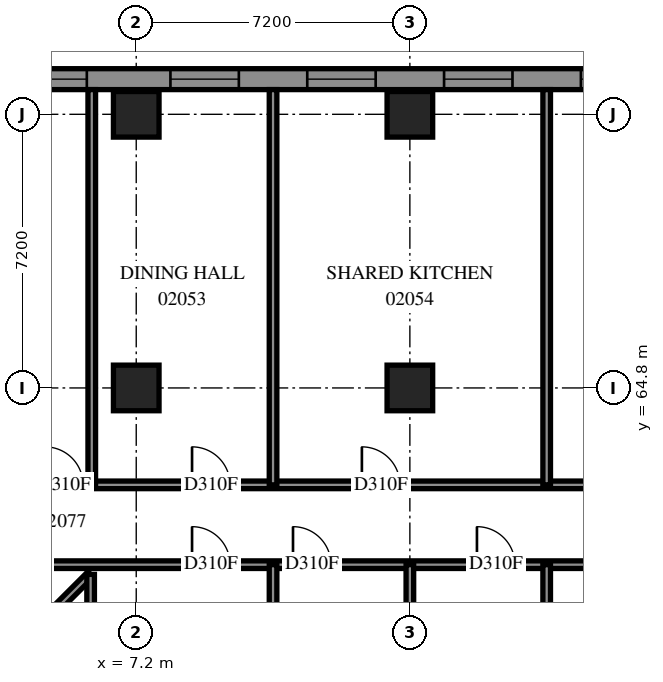
"""IFC4 building model, lengths in metres.
Left out: names, types, materials, properties, quantities, classifications, styles, units other than length and angle.
Written with IfcOpenShell. Run it as: python <this file> out.ifc"""

import sys

from ifc_helpers import new_model, si_unit, direction, frame, frame_2d, origin, origin_2d, place, context, subcontext, project, spatial, polyline, rectangle, outline, extrude, element, fill, save


model = new_model("IFC4")
c1 = context("Model", 3, precision=1e-05, world=origin(), true_north=direction((0.0, 1.0)))
c2 = subcontext(c1, "Body", "Model", "MODEL_VIEW")
j1 = project(units=[si_unit("LENGTHUNIT", "METRE"), si_unit("PLANEANGLEUNIT", "RADIAN")], contexts=[c1])
p1 = place(None, origin())
s1 = spatial("IfcSite", under=j1, at=p1, CompositionType="ELEMENT")
p2 = place(p1, origin())
s2 = spatial("IfcBuilding", under=s1, at=p2, CompositionType="ELEMENT")
p3 = place(p2, frame((0.0, 0.0, 10.2)))
s3 = spatial("IfcBuildingStorey", under=s2, at=p3, CompositionType="ELEMENT", Elevation=10.2)
for number, where, z_axis, x_axis in (
    (1, (7.2, 64.8, 0.0), (0.0, 0.0, 1.0), (1.0, 0.0, 0.0)),
    (2, (7.2, 72.0, 0.0), (0.0, 0.0, 1.0), (1.0, 0.0, 0.0)),
    (3, (14.4, 64.8, 0.0), (0.0, 0.0, 1.0), (1.0, 0.0, 0.0)),
    (4, (14.4, 72.0, 0.0), (0.0, 0.0, 1.0), (1.0, 0.0, 0.0)),
):
    element("IfcColumn", number, at=place(p3, frame(where, z_axis=z_axis, x_axis=x_axis)), inside=s3, PredefinedType="COLUMN", context=c2, shape_type="SweptSolid", body=[
        extrude(rectangle(XDim=1.2, YDim=1.2, at=origin_2d()), origin(), (0.0, 0.0, 1.0), 3.8),
    ])
p4 = place(p3, frame((79.583, 72.925, 0.0), z_axis=(0.0, 0.0, 1.0), x_axis=(-1.0, 0.0, 0.0)))
e5 = element("IfcWall", 5, at=p4, inside=s3, PredefinedType="SOLIDWALL", context=c2, shape_type="SweptSolid", body=[
    extrude(outline(polyline([(-0.114, -0.275), (79.583, -0.275), (79.033, 0.275), (0.114, 0.275), (-0.114, -0.275)])), origin(), (0.0, 0.0, 1.0), 3.8),
])
p5 = place(p4, frame((1.249, 0.0, 0.7)))
e6 = element("IfcOpeningElement", 6, at=p5, cuts=e5, PredefinedType="OPENING", context=c2, shape_type="SweptSolid", body=[
    extrude(rectangle(XDim=1.8, YDim=2.6, at=frame_2d((0.9, 1.3))), frame((0.0, 0.285, 0.0), z_axis=(0.0, -1.0, 0.0), x_axis=(1.0, 0.0, 0.0)), (0.0, 0.0, 1.0), 0.57),
])
p6 = place(p4, frame((4.883, 0.0, 0.7)))
e7 = element("IfcOpeningElement", 7, at=p6, cuts=e5, PredefinedType="OPENING", context=c2, shape_type="SweptSolid", body=[
    extrude(rectangle(XDim=1.8, YDim=2.6, at=frame_2d((0.9, 1.3))), frame((0.0, 0.285, 0.0), z_axis=(0.0, -1.0, 0.0), x_axis=(1.0, 0.0, 0.0)), (0.0, 0.0, 1.0), 0.57),
])
p7 = place(p4, frame((8.483, 0.0, 0.7)))
e8 = element("IfcOpeningElement", 8, at=p7, cuts=e5, PredefinedType="OPENING", context=c2, shape_type="SweptSolid", body=[
    extrude(rectangle(XDim=1.8, YDim=2.6, at=frame_2d((0.9, 1.3))), frame((0.0, 0.285, 0.0), z_axis=(0.0, -1.0, 0.0), x_axis=(1.0, 0.0, 0.0)), (0.0, 0.0, 1.0), 0.57),
])
p8 = place(p4, frame((12.083, 0.0, 0.7)))
e9 = element("IfcOpeningElement", 9, at=p8, cuts=e5, PredefinedType="OPENING", context=c2, shape_type="SweptSolid", body=[
    extrude(rectangle(XDim=1.8, YDim=2.6, at=frame_2d((0.9, 1.3))), frame((0.0, 0.285, 0.0), z_axis=(0.0, -1.0, 0.0), x_axis=(1.0, 0.0, 0.0)), (0.0, 0.0, 1.0), 0.57),
])
p9 = place(p4, frame((15.683, 0.0, 0.7)))
e10 = element("IfcOpeningElement", 10, at=p9, cuts=e5, PredefinedType="OPENING", context=c2, shape_type="SweptSolid", body=[
    extrude(rectangle(XDim=1.8, YDim=2.6, at=frame_2d((0.9, 1.3))), frame((0.0, 0.285, 0.0), z_axis=(0.0, -1.0, 0.0), x_axis=(1.0, 0.0, 0.0)), (0.0, 0.0, 1.0), 0.57),
])
p10 = place(p4, frame((19.283, 0.0, 0.7)))
e11 = element("IfcOpeningElement", 11, at=p10, cuts=e5, PredefinedType="OPENING", context=c2, shape_type="SweptSolid", body=[
    extrude(rectangle(XDim=1.8, YDim=2.6, at=frame_2d((0.9, 1.3))), frame((0.0, 0.285, 0.0), z_axis=(0.0, -1.0, 0.0), x_axis=(1.0, 0.0, 0.0)), (0.0, 0.0, 1.0), 0.57),
])
p11 = place(p4, frame((22.883, 0.0, 0.7)))
e12 = element("IfcOpeningElement", 12, at=p11, cuts=e5, PredefinedType="OPENING", context=c2, shape_type="SweptSolid", body=[
    extrude(rectangle(XDim=1.8, YDim=2.6, at=frame_2d((0.9, 1.3))), frame((0.0, 0.285, 0.0), z_axis=(0.0, -1.0, 0.0), x_axis=(1.0, 0.0, 0.0)), (0.0, 0.0, 1.0), 0.57),
])
p12 = place(p4, frame((26.483, 0.0, 0.7)))
e13 = element("IfcOpeningElement", 13, at=p12, cuts=e5, PredefinedType="OPENING", context=c2, shape_type="SweptSolid", body=[
    extrude(rectangle(XDim=1.8, YDim=2.6, at=frame_2d((0.9, 1.3))), frame((0.0, 0.285, 0.0), z_axis=(0.0, -1.0, 0.0), x_axis=(1.0, 0.0, 0.0)), (0.0, 0.0, 1.0), 0.57),
])
p13 = place(p4, frame((30.083, 0.0, 0.7)))
e14 = element("IfcOpeningElement", 14, at=p13, cuts=e5, PredefinedType="OPENING", context=c2, shape_type="SweptSolid", body=[
    extrude(rectangle(XDim=1.8, YDim=2.6, at=frame_2d((0.9, 1.3))), frame((0.0, 0.285, 0.0), z_axis=(0.0, -1.0, 0.0), x_axis=(1.0, 0.0, 0.0)), (0.0, 0.0, 1.0), 0.57),
])
p14 = place(p4, frame((33.683, 0.0, 0.7)))
e15 = element("IfcOpeningElement", 15, at=p14, cuts=e5, PredefinedType="OPENING", context=c2, shape_type="SweptSolid", body=[
    extrude(rectangle(XDim=1.8, YDim=2.6, at=frame_2d((0.9, 1.3))), frame((0.0, 0.285, 0.0), z_axis=(0.0, -1.0, 0.0), x_axis=(1.0, 0.0, 0.0)), (0.0, 0.0, 1.0), 0.57),
])
p15 = place(p4, frame((37.283, 0.0, 0.7)))
e16 = element("IfcOpeningElement", 16, at=p15, cuts=e5, PredefinedType="OPENING", context=c2, shape_type="SweptSolid", body=[
    extrude(rectangle(XDim=1.8, YDim=2.6, at=frame_2d((0.9, 1.3))), frame((0.0, 0.285, 0.0), z_axis=(0.0, -1.0, 0.0), x_axis=(1.0, 0.0, 0.0)), (0.0, 0.0, 1.0), 0.57),
])
p16 = place(p4, frame((40.883, 0.0, 0.7)))
e17 = element("IfcOpeningElement", 17, at=p16, cuts=e5, PredefinedType="OPENING", context=c2, shape_type="SweptSolid", body=[
    extrude(rectangle(XDim=1.8, YDim=2.6, at=frame_2d((0.9, 1.3))), frame((0.0, 0.285, 0.0), z_axis=(0.0, -1.0, 0.0), x_axis=(1.0, 0.0, 0.0)), (0.0, 0.0, 1.0), 0.57),
])
p17 = place(p4, frame((44.483, 0.0, 0.7)))
e18 = element("IfcOpeningElement", 18, at=p17, cuts=e5, PredefinedType="OPENING", context=c2, shape_type="SweptSolid", body=[
    extrude(rectangle(XDim=1.8, YDim=2.6, at=frame_2d((0.9, 1.3))), frame((0.0, 0.285, 0.0), z_axis=(0.0, -1.0, 0.0), x_axis=(1.0, 0.0, 0.0)), (0.0, 0.0, 1.0), 0.57),
])
p18 = place(p4, frame((48.083, 0.0, 0.7)))
e19 = element("IfcOpeningElement", 19, at=p18, cuts=e5, PredefinedType="OPENING", context=c2, shape_type="SweptSolid", body=[
    extrude(rectangle(XDim=1.8, YDim=2.6, at=frame_2d((0.9, 1.3))), frame((0.0, 0.285, 0.0), z_axis=(0.0, -1.0, 0.0), x_axis=(1.0, 0.0, 0.0)), (0.0, 0.0, 1.0), 0.57),
])
p19 = place(p4, frame((51.683, 0.0, 0.7)))
e20 = element("IfcOpeningElement", 20, at=p19, cuts=e5, PredefinedType="OPENING", context=c2, shape_type="SweptSolid", body=[
    extrude(rectangle(XDim=1.8, YDim=2.6, at=frame_2d((0.9, 1.3))), frame((0.0, 0.285, 0.0), z_axis=(0.0, -1.0, 0.0), x_axis=(1.0, 0.0, 0.0)), (0.0, 0.0, 1.0), 0.57),
])
p20 = place(p4, frame((55.283, 0.0, 0.7)))
e21 = element("IfcOpeningElement", 21, at=p20, cuts=e5, PredefinedType="OPENING", context=c2, shape_type="SweptSolid", body=[
    extrude(rectangle(XDim=1.8, YDim=2.6, at=frame_2d((0.9, 1.3))), frame((0.0, 0.285, 0.0), z_axis=(0.0, -1.0, 0.0), x_axis=(1.0, 0.0, 0.0)), (0.0, 0.0, 1.0), 0.57),
])
p21 = place(p4, frame((58.883, 0.0, 0.7)))
e22 = element("IfcOpeningElement", 22, at=p21, cuts=e5, PredefinedType="OPENING", context=c2, shape_type="SweptSolid", body=[
    extrude(rectangle(XDim=1.8, YDim=2.6, at=frame_2d((0.9, 1.3))), frame((0.0, 0.285, 0.0), z_axis=(0.0, -1.0, 0.0), x_axis=(1.0, 0.0, 0.0)), (0.0, 0.0, 1.0), 0.57),
])
p22 = place(p4, frame((62.483, 0.0, 0.7)))
e23 = element("IfcOpeningElement", 23, at=p22, cuts=e5, PredefinedType="OPENING", context=c2, shape_type="SweptSolid", body=[
    extrude(rectangle(XDim=1.8, YDim=2.6, at=frame_2d((0.9, 1.3))), frame((0.0, 0.285, 0.0), z_axis=(0.0, -1.0, 0.0), x_axis=(1.0, 0.0, 0.0)), (0.0, 0.0, 1.0), 0.57),
])
p23 = place(p4, frame((66.083, 0.0, 0.7)))
e24 = element("IfcOpeningElement", 24, at=p23, cuts=e5, PredefinedType="OPENING", context=c2, shape_type="SweptSolid", body=[
    extrude(rectangle(XDim=1.8, YDim=2.6, at=frame_2d((0.9, 1.3))), frame((0.0, 0.285, 0.0), z_axis=(0.0, -1.0, 0.0), x_axis=(1.0, 0.0, 0.0)), (0.0, 0.0, 1.0), 0.57),
])
p24 = place(p4, frame((69.683, 0.0, 0.7)))
e25 = element("IfcOpeningElement", 25, at=p24, cuts=e5, PredefinedType="OPENING", context=c2, shape_type="SweptSolid", body=[
    extrude(rectangle(XDim=1.8, YDim=2.6, at=frame_2d((0.9, 1.3))), frame((0.0, 0.285, 0.0), z_axis=(0.0, -1.0, 0.0), x_axis=(1.0, 0.0, 0.0)), (0.0, 0.0, 1.0), 0.57),
])
p25 = place(p4, frame((73.683, 0.0, 0.7)))
e26 = element("IfcOpeningElement", 26, at=p25, cuts=e5, PredefinedType="OPENING", context=c2, shape_type="SweptSolid", body=[
    extrude(rectangle(XDim=1.8, YDim=2.6, at=frame_2d((0.9, 1.3))), frame((0.0, 0.285, 0.0), z_axis=(0.0, -1.0, 0.0), x_axis=(1.0, 0.0, 0.0)), (0.0, 0.0, 1.0), 0.57),
])
p26 = place(p4, frame((76.508, 0.0, 0.7)))
e27 = element("IfcOpeningElement", 27, at=p26, cuts=e5, PredefinedType="OPENING", context=c2, shape_type="SweptSolid", body=[
    extrude(rectangle(XDim=1.8, YDim=2.6, at=frame_2d((0.9, 1.3))), frame((0.0, 0.285, 0.0), z_axis=(0.0, -1.0, 0.0), x_axis=(1.0, 0.0, 0.0)), (0.0, 0.0, 1.0), 0.57),
])
p27 = place(p3, frame((0.002, 60.15, 0.0), z_axis=(0.0, 0.0, 1.0), x_axis=(1.0, 0.0, 0.0)))
e28 = element("IfcWall", 28, at=p27, inside=s3, PredefinedType="PARTITIONING", context=c2, shape_type="SweptSolid", body=[
    extrude(rectangle(XDim=54.498, YDim=0.2, at=frame_2d((27.249, 0.0))), origin(), (0.0, 0.0, 1.0), 3.8),
])
p28 = place(p27, frame((8.667, 0.0, 0.0)))
e29 = element("IfcOpeningElement", 29, at=p28, cuts=e28, PredefinedType="OPENING", context=c2, shape_type="SweptSolid", body=[
    extrude(rectangle(XDim=1.0, YDim=2.1, at=frame_2d((0.5, 1.05))), frame((0.0, 0.11, 0.0), z_axis=(0.0, -1.0, 0.0), x_axis=(1.0, 0.0, 0.0)), (0.0, 0.0, 1.0), 0.22),
])
p29 = place(p27, frame((11.323, 0.0, 0.0)))
e30 = element("IfcOpeningElement", 30, at=p29, cuts=e28, PredefinedType="OPENING", context=c2, shape_type="SweptSolid", body=[
    extrude(rectangle(XDim=1.0, YDim=2.1, at=frame_2d((0.5, 1.05))), frame((0.0, 0.11, 0.0), z_axis=(0.0, -1.0, 0.0), x_axis=(1.0, 0.0, 0.0)), (0.0, 0.0, 1.0), 0.22),
])
p30 = place(p27, frame((16.163, 0.0, 0.0)))
e31 = element("IfcOpeningElement", 31, at=p30, cuts=e28, PredefinedType="OPENING", context=c2, shape_type="SweptSolid", body=[
    extrude(rectangle(XDim=1.0, YDim=2.1, at=frame_2d((0.5, 1.05))), frame((0.0, 0.11, 0.0), z_axis=(0.0, -1.0, 0.0), x_axis=(1.0, 0.0, 0.0)), (0.0, 0.0, 1.0), 0.22),
])
p31 = place(p27, frame((22.14, 0.0, 0.0)))
e32 = element("IfcOpeningElement", 32, at=p31, cuts=e28, PredefinedType="OPENING", context=c2, shape_type="SweptSolid", body=[
    extrude(rectangle(XDim=1.0, YDim=2.1, at=frame_2d((0.5, 1.05))), frame((0.0, 0.11, 0.0), z_axis=(0.0, -1.0, 0.0), x_axis=(1.0, 0.0, 0.0)), (0.0, 0.0, 1.0), 0.22),
])
p32 = place(p27, frame((30.563, 0.0, 0.0)))
e33 = element("IfcOpeningElement", 33, at=p32, cuts=e28, PredefinedType="OPENING", context=c2, shape_type="SweptSolid", body=[
    extrude(rectangle(XDim=1.0, YDim=2.1, at=frame_2d((0.5, 1.05))), frame((0.0, 0.11, 0.0), z_axis=(0.0, -1.0, 0.0), x_axis=(1.0, 0.0, 0.0)), (0.0, 0.0, 1.0), 0.22),
])
p33 = place(p27, frame((33.233, 0.0, 0.0)))
e34 = element("IfcOpeningElement", 34, at=p33, cuts=e28, PredefinedType="OPENING", context=c2, shape_type="SweptSolid", body=[
    extrude(rectangle(XDim=1.0, YDim=2.1, at=frame_2d((0.5, 1.05))), frame((0.0, 0.11, 0.0), z_axis=(0.0, -1.0, 0.0), x_axis=(1.0, 0.0, 0.0)), (0.0, 0.0, 1.0), 0.22),
])
p34 = place(p27, frame((38.073, 0.0, 0.0)))
e35 = element("IfcOpeningElement", 35, at=p34, cuts=e28, PredefinedType="OPENING", context=c2, shape_type="SweptSolid", body=[
    extrude(rectangle(XDim=1.0, YDim=2.1, at=frame_2d((0.5, 1.05))), frame((0.0, 0.11, 0.0), z_axis=(0.0, -1.0, 0.0), x_axis=(1.0, 0.0, 0.0)), (0.0, 0.0, 1.0), 0.22),
])
p35 = place(p27, frame((40.123, 0.0, 0.0)))
e36 = element("IfcOpeningElement", 36, at=p35, cuts=e28, PredefinedType="OPENING", context=c2, shape_type="SweptSolid", body=[
    extrude(rectangle(XDim=1.0, YDim=2.1, at=frame_2d((0.5, 1.05))), frame((0.0, 0.11, 0.0), z_axis=(0.0, -1.0, 0.0), x_axis=(1.0, 0.0, 0.0)), (0.0, 0.0, 1.0), 0.22),
])
p36 = place(p27, frame((44.963, 0.0, 0.0)))
e37 = element("IfcOpeningElement", 37, at=p36, cuts=e28, PredefinedType="OPENING", context=c2, shape_type="SweptSolid", body=[
    extrude(rectangle(XDim=1.0, YDim=2.1, at=frame_2d((0.5, 1.05))), frame((0.0, 0.11, 0.0), z_axis=(0.0, -1.0, 0.0), x_axis=(1.0, 0.0, 0.0)), (0.0, 0.0, 1.0), 0.22),
])
p37 = place(p27, frame((47.323, 0.0, 0.0)))
e38 = element("IfcOpeningElement", 38, at=p37, cuts=e28, PredefinedType="OPENING", context=c2, shape_type="SweptSolid", body=[
    extrude(rectangle(XDim=1.0, YDim=2.1, at=frame_2d((0.5, 1.05))), frame((0.0, 0.11, 0.0), z_axis=(0.0, -1.0, 0.0), x_axis=(1.0, 0.0, 0.0)), (0.0, 0.0, 1.0), 0.22),
])
p38 = place(p27, frame((3.747, 0.0, 0.0)))
e39 = element("IfcOpeningElement", 39, at=p38, cuts=e28, PredefinedType="OPENING", context=c2, shape_type="SweptSolid", body=[
    extrude(rectangle(XDim=1.0, YDim=2.1, at=frame_2d((0.5, 1.05))), frame((0.0, 0.11, 0.0), z_axis=(0.0, -1.0, 0.0), x_axis=(1.0, 0.0, 0.0)), (0.0, 0.0, 1.0), 0.22),
])
p39 = place(p3, frame((0.002, 62.25, 0.0), z_axis=(0.0, 0.0, 1.0), x_axis=(1.0, 0.0, 0.0)))
e40 = element("IfcWall", 40, at=p39, inside=s3, PredefinedType="PARTITIONING", context=c2, shape_type="SweptSolid", body=[
    extrude(rectangle(XDim=54.498, YDim=0.2, at=frame_2d((27.249, 0.0))), origin(), (0.0, 0.0, 1.0), 3.8),
])
p40 = place(p39, frame((8.667, 0.0, 0.0)))
e41 = element("IfcOpeningElement", 41, at=p40, cuts=e40, PredefinedType="OPENING", context=c2, shape_type="SweptSolid", body=[
    extrude(rectangle(XDim=1.0, YDim=2.1, at=frame_2d((0.5, 1.05))), frame((0.0, 0.11, 0.0), z_axis=(0.0, -1.0, 0.0), x_axis=(1.0, 0.0, 0.0)), (0.0, 0.0, 1.0), 0.22),
])
p41 = place(p39, frame((13.136, 0.0, 0.0)))
e42 = element("IfcOpeningElement", 42, at=p41, cuts=e40, PredefinedType="OPENING", context=c2, shape_type="SweptSolid", body=[
    extrude(rectangle(XDim=1.0, YDim=2.1, at=frame_2d((0.5, 1.05))), frame((0.0, 0.11, 0.0), z_axis=(0.0, -1.0, 0.0), x_axis=(1.0, 0.0, 0.0)), (0.0, 0.0, 1.0), 0.22),
])
p42 = place(p39, frame((20.335, 0.0, 0.0)))
e43 = element("IfcOpeningElement", 43, at=p42, cuts=e40, PredefinedType="OPENING", context=c2, shape_type="SweptSolid", body=[
    extrude(rectangle(XDim=1.0, YDim=2.1, at=frame_2d((0.5, 1.05))), frame((0.0, 0.11, 0.0), z_axis=(0.0, -1.0, 0.0), x_axis=(1.0, 0.0, 0.0)), (0.0, 0.0, 1.0), 0.22),
])
p43 = place(p39, frame((27.535, 0.0, 0.0)))
e44 = element("IfcOpeningElement", 44, at=p43, cuts=e40, PredefinedType="OPENING", context=c2, shape_type="SweptSolid", body=[
    extrude(rectangle(XDim=1.0, YDim=2.1, at=frame_2d((0.5, 1.05))), frame((0.0, 0.11, 0.0), z_axis=(0.0, -1.0, 0.0), x_axis=(1.0, 0.0, 0.0)), (0.0, 0.0, 1.0), 0.22),
])
p44 = place(p39, frame((34.736, 0.0, 0.0)))
e45 = element("IfcOpeningElement", 45, at=p44, cuts=e40, PredefinedType="OPENING", context=c2, shape_type="SweptSolid", body=[
    extrude(rectangle(XDim=1.0, YDim=2.1, at=frame_2d((0.5, 1.05))), frame((0.0, 0.11, 0.0), z_axis=(0.0, -1.0, 0.0), x_axis=(1.0, 0.0, 0.0)), (0.0, 0.0, 1.0), 0.22),
])
p45 = place(p39, frame((41.935, 0.0, 0.0)))
e46 = element("IfcOpeningElement", 46, at=p45, cuts=e40, PredefinedType="OPENING", context=c2, shape_type="SweptSolid", body=[
    extrude(rectangle(XDim=1.0, YDim=2.1, at=frame_2d((0.5, 1.05))), frame((0.0, 0.11, 0.0), z_axis=(0.0, -1.0, 0.0), x_axis=(1.0, 0.0, 0.0)), (0.0, 0.0, 1.0), 0.22),
])
p46 = place(p39, frame((49.136, 0.0, 0.0)))
e47 = element("IfcOpeningElement", 47, at=p46, cuts=e40, PredefinedType="OPENING", context=c2, shape_type="SweptSolid", body=[
    extrude(rectangle(XDim=1.0, YDim=2.1, at=frame_2d((0.5, 1.05))), frame((0.0, 0.11, 0.0), z_axis=(0.0, -1.0, 0.0), x_axis=(1.0, 0.0, 0.0)), (0.0, 0.0, 1.0), 0.22),
])
p47 = place(p39, frame((4.799, 0.0, 0.0)))
e48 = element("IfcOpeningElement", 48, at=p47, cuts=e40, PredefinedType="OPENING", context=c2, shape_type="SweptSolid", body=[
    extrude(rectangle(XDim=1.0, YDim=2.1, at=frame_2d((0.5, 1.05))), frame((0.0, 0.11, 0.0), z_axis=(0.0, -1.0, 0.0), x_axis=(1.0, 0.0, 0.0)), (0.0, 0.0, 1.0), 0.22),
])
for number, where, z_axis, x_axis in (
    (49, (6.03, 62.25, 0.0), (0.0, 0.0, 1.0), (0.0, 1.0, 0.0)),
    (50, (10.8, 62.25, 0.0), (0.0, 0.0, 1.0), (0.0, 1.0, 0.0)),
    (51, (18.0, 62.25, 0.0), (0.0, 0.0, 1.0), (0.0, 1.0, 0.0)),
):
    element("IfcWall", number, at=place(p3, frame(where, z_axis=z_axis, x_axis=x_axis)), inside=s3, PredefinedType="PARTITIONING", context=c2, shape_type="SweptSolid", body=[
        extrude(rectangle(XDim=10.4, YDim=0.2, at=frame_2d((5.2, 0.0))), origin(), (0.0, 0.0, 1.0), 3.8),
    ])
p48 = place(p3, frame((1.155, 55.051, 0.0), z_axis=(0.0, 0.0, 1.0), x_axis=(0.7071067812, 0.7071067812, 0.0)))
e52 = element("IfcWall", 52, at=p48, inside=s3, PredefinedType="PARTITIONING", context=c2, shape_type="SweptSolid", body=[
    extrude(rectangle(XDim=6.851, YDim=0.2, at=frame_2d((3.425, 0.0))), origin(), (0.0, 0.0, 1.0), 3.8),
])
for number, where, z_axis, x_axis in (
    (53, (10.8, 55.05, 0.0), (0.0, 0.0, 1.0), (0.0, 1.0, 0.0)),
    (54, (18.0, 55.05, 0.0), (0.0, 0.0, 1.0), (0.0, 1.0, 0.0)),
):
    element("IfcWall", number, at=place(p3, frame(where, z_axis=z_axis, x_axis=x_axis)), inside=s3, PredefinedType="PARTITIONING", context=c2, shape_type="SweptSolid", body=[
        extrude(rectangle(XDim=5.1, YDim=0.2, at=frame_2d((2.55, 0.0))), origin(), (0.0, 0.0, 1.0), 3.8),
    ])
p49 = place(p3, frame((6.0, 55.05, 0.0), z_axis=(0.0, 0.0, 1.0), x_axis=(0.0, 1.0, 0.0)))
e55 = element("IfcWall", 55, at=p49, inside=s3, PredefinedType="PARTITIONING", context=c2, shape_type="SweptSolid", body=[
    extrude(rectangle(XDim=4.844, YDim=0.2, at=frame_2d((2.422, 0.0))), origin(), (0.0, 0.0, 1.0), 3.8),
])
p50 = place(p3, frame((14.4, 58.306, 0.0), z_axis=(0.0, 0.0, 1.0), x_axis=(0.0, 1.0, 0.0)))
e56 = element("IfcWall", 56, at=p50, inside=s3, PredefinedType="PARTITIONING", context=c2, shape_type="SweptSolid", body=[
    extrude(rectangle(XDim=1.844, YDim=0.2, at=frame_2d((0.922, 0.0))), origin(), (0.0, 0.0, 1.0), 3.8),
])
p51 = place(p21, origin())
e57 = element("IfcWindow", 57, at=p51, inside=s3, PartitioningType="SINGLE_PANEL", PredefinedType="WINDOW", context=c2, shape_type="SweptSolid", body=[
    extrude(rectangle(XDim=1.8, YDim=2.6, at=frame_2d((0.9, 1.3))), frame((0.0, 0.155, 0.0), z_axis=(0.0, -1.0, 0.0), x_axis=(1.0, 0.0, 0.0)), (0.0, 0.0, 1.0), 0.06),
])
fill(e22, e57)
p52 = place(p22, origin())
e58 = element("IfcWindow", 58, at=p52, inside=s3, PartitioningType="SINGLE_PANEL", PredefinedType="WINDOW", context=c2, shape_type="SweptSolid", body=[
    extrude(rectangle(XDim=1.8, YDim=2.6, at=frame_2d((0.9, 1.3))), frame((0.0, 0.155, 0.0), z_axis=(0.0, -1.0, 0.0), x_axis=(1.0, 0.0, 0.0)), (0.0, 0.0, 1.0), 0.06),
])
fill(e23, e58)
p53 = place(p23, origin())
e59 = element("IfcWindow", 59, at=p53, inside=s3, PartitioningType="SINGLE_PANEL", PredefinedType="WINDOW", context=c2, shape_type="SweptSolid", body=[
    extrude(rectangle(XDim=1.8, YDim=2.6, at=frame_2d((0.9, 1.3))), frame((0.0, 0.155, 0.0), z_axis=(0.0, -1.0, 0.0), x_axis=(1.0, 0.0, 0.0)), (0.0, 0.0, 1.0), 0.06),
])
fill(e24, e59)
p54 = place(p24, origin())
e60 = element("IfcWindow", 60, at=p54, inside=s3, PartitioningType="SINGLE_PANEL", PredefinedType="WINDOW", context=c2, shape_type="SweptSolid", body=[
    extrude(rectangle(XDim=1.8, YDim=2.6, at=frame_2d((0.9, 1.3))), frame((0.0, 0.155, 0.0), z_axis=(0.0, -1.0, 0.0), x_axis=(1.0, 0.0, 0.0)), (0.0, 0.0, 1.0), 0.06),
])
fill(e25, e60)
p55 = place(p25, origin())
e61 = element("IfcWindow", 61, at=p55, inside=s3, PartitioningType="SINGLE_PANEL", PredefinedType="WINDOW", context=c2, shape_type="SweptSolid", body=[
    extrude(rectangle(XDim=1.8, YDim=2.6, at=frame_2d((0.9, 1.3))), frame((0.0, 0.155, 0.0), z_axis=(0.0, -1.0, 0.0), x_axis=(1.0, 0.0, 0.0)), (0.0, 0.0, 1.0), 0.06),
])
fill(e26, e61)
p56 = place(p28, origin())
e62 = element("IfcDoor", 62, at=p56, inside=s3, OperationType="SINGLE_SWING_LEFT", PredefinedType="DOOR", context=c2, shape_type="SweptSolid", body=[
    extrude(rectangle(XDim=1.0, YDim=2.1, at=frame_2d((0.5, 1.05))), frame((0.0, 0.025, 0.0), z_axis=(0.0, -1.0, 0.0), x_axis=(1.0, 0.0, 0.0)), (0.0, 0.0, 1.0), 0.05),
])
fill(e29, e62)
p57 = place(p29, origin())
e63 = element("IfcDoor", 63, at=p57, inside=s3, OperationType="SINGLE_SWING_RIGHT", PredefinedType="DOOR", context=c2, shape_type="SweptSolid", body=[
    extrude(rectangle(XDim=1.0, YDim=2.1, at=frame_2d((0.5, 1.05))), frame((0.0, 0.025, 0.0), z_axis=(0.0, -1.0, 0.0), x_axis=(1.0, 0.0, 0.0)), (0.0, 0.0, 1.0), 0.05),
])
fill(e30, e63)
p58 = place(p30, origin())
e64 = element("IfcDoor", 64, at=p58, inside=s3, OperationType="SINGLE_SWING_LEFT", PredefinedType="DOOR", context=c2, shape_type="SweptSolid", body=[
    extrude(rectangle(XDim=1.0, YDim=2.1, at=frame_2d((0.5, 1.05))), frame((0.0, 0.025, 0.0), z_axis=(0.0, -1.0, 0.0), x_axis=(1.0, 0.0, 0.0)), (0.0, 0.0, 1.0), 0.05),
])
fill(e31, e64)
p59 = place(p40, origin())
e65 = element("IfcDoor", 65, at=p59, inside=s3, OperationType="SINGLE_SWING_RIGHT", PredefinedType="DOOR", context=c2, shape_type="SweptSolid", body=[
    extrude(rectangle(XDim=1.0, YDim=2.1, at=frame_2d((0.5, 1.05))), frame((0.0, 0.025, 0.0), z_axis=(0.0, -1.0, 0.0), x_axis=(1.0, 0.0, 0.0)), (0.0, 0.0, 1.0), 0.05),
])
fill(e41, e65)
p60 = place(p41, origin())
e66 = element("IfcDoor", 66, at=p60, inside=s3, OperationType="SINGLE_SWING_LEFT", PredefinedType="DOOR", context=c2, shape_type="SweptSolid", body=[
    extrude(rectangle(XDim=1.0, YDim=2.1, at=frame_2d((0.5, 1.05))), frame((0.0, 0.025, 0.0), z_axis=(0.0, -1.0, 0.0), x_axis=(1.0, 0.0, 0.0)), (0.0, 0.0, 1.0), 0.05),
])
fill(e42, e66)
p61 = place(p47, origin())
e67 = element("IfcDoor", 67, at=p61, inside=s3, OperationType="SINGLE_SWING_LEFT", PredefinedType="DOOR", context=c2, shape_type="SweptSolid", body=[
    extrude(rectangle(XDim=1.0, YDim=2.1, at=frame_2d((0.5, 1.05))), frame((0.0, 0.025, 0.0), z_axis=(0.0, -1.0, 0.0), x_axis=(1.0, 0.0, 0.0)), (0.0, 0.0, 1.0), 0.05),
])
fill(e48, e67)
save(model, sys.argv[1])
